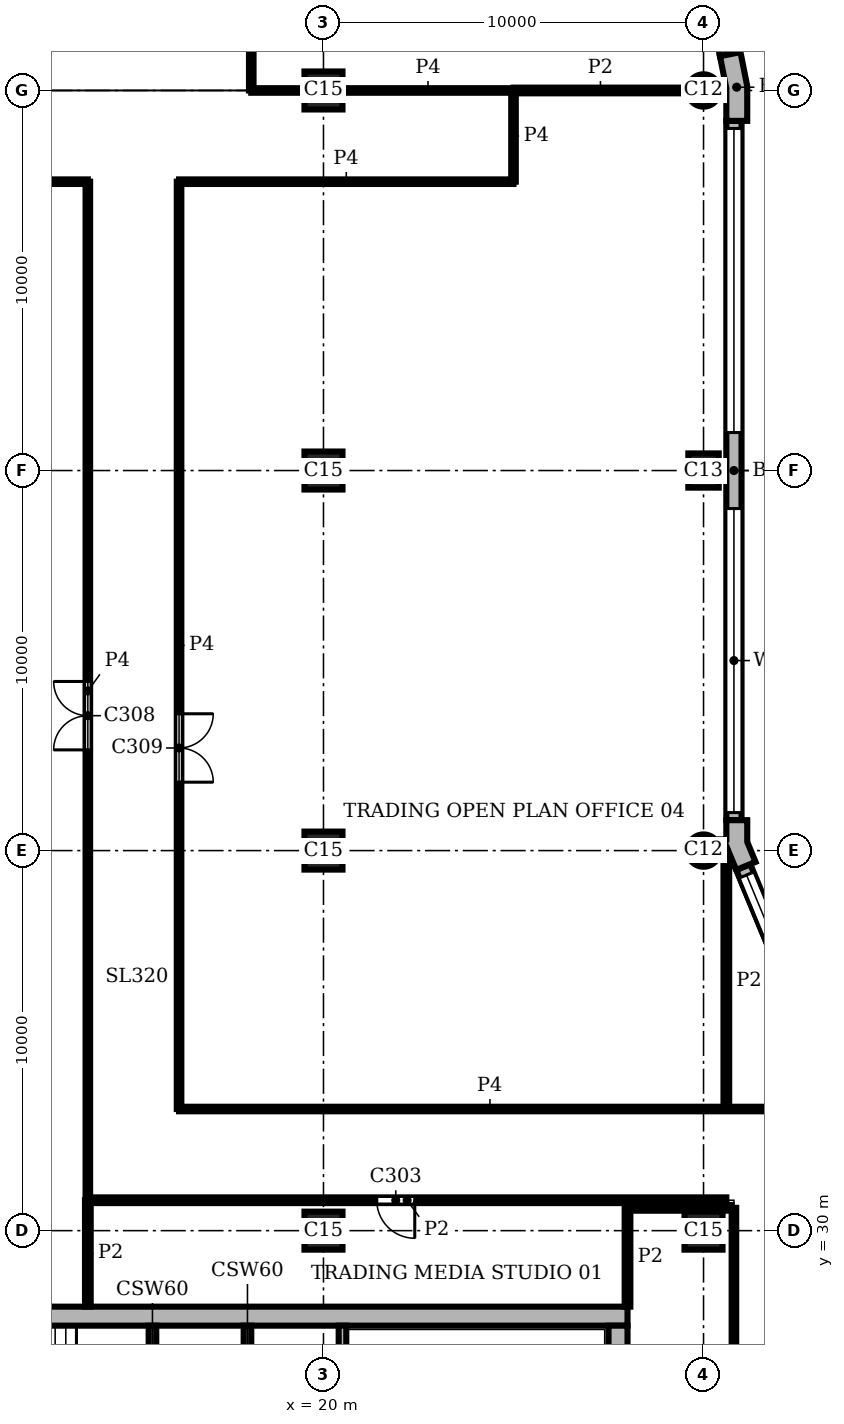
"""IFC4 building model, lengths in metres.
Left out: names, types, materials, properties, quantities, classifications, styles, units other than length and angle.
Written with IfcOpenShell. Run it as: python <this file> out.ifc"""

import sys

from ifc_helpers import new_model, si_unit, direction, frame, frame_2d, origin, origin_2d, place, context, subcontext, project, spatial, polyline, rectangle, circle, outline, extrude, element, fill, save


model = new_model("IFC4")
c1 = context("Model", 3, precision=1e-05, world=origin(), true_north=direction((0.0, 1.0)))
c2 = subcontext(c1, "Body", "Model", "MODEL_VIEW")
j1 = project(units=[si_unit("LENGTHUNIT", "METRE"), si_unit("PLANEANGLEUNIT", "RADIAN")], contexts=[c1])
p1 = place(None, origin())
s1 = spatial("IfcSite", under=j1, at=p1, CompositionType="ELEMENT")
p2 = place(p1, origin())
s2 = spatial("IfcBuilding", under=s1, at=p2, CompositionType="ELEMENT")
p3 = place(p2, frame((0.0, 0.0, 274.8)))
s3 = spatial("IfcBuildingStorey", under=s2, at=p3, CompositionType="ELEMENT", Elevation=274.8)
p4 = place(p3, frame((30.0, 40.0, 0.0), z_axis=(0.0, 0.0, 1.0), x_axis=(1.0, 0.0, 0.0)))
e1 = element("IfcColumn", 1, at=p4, inside=s3, PredefinedType="COLUMN", context=c2, shape_type="SweptSolid", body=[
    extrude(circle(Radius=0.425, at=origin_2d()), origin(), (0.0, 0.0, 1.0), 3.9),
])
p5 = place(p3, frame((30.0, 50.0, 0.0), z_axis=(0.0, 0.0, 1.0), x_axis=(0.0, 1.0, 0.0)))
e2 = element("IfcColumn", 2, at=p5, inside=s3, PredefinedType="COLUMN", context=c2, shape_type="SweptSolid", body=[
    extrude(rectangle(XDim=0.9, YDim=0.8, at=origin_2d()), origin(), (0.0, 0.0, 1.0), 3.9),
])
p6 = place(p3, frame((30.0, 60.0, 0.0), z_axis=(0.0, 0.0, 1.0), x_axis=(1.0, 0.0, 0.0)))
e3 = element("IfcColumn", 3, at=p6, inside=s3, PredefinedType="COLUMN", context=c2, shape_type="SweptSolid", body=[
    extrude(circle(Radius=0.425, at=origin_2d()), origin(), (0.0, 0.0, 1.0), 3.9),
])
for number, where, z_axis, x_axis in (
    (4, (20.0, 30.0, 0.0), (0.0, 0.0, 1.0), (1.0, 0.0, 0.0)),
    (5, (20.0, 40.0, 0.0), (0.0, 0.0, 1.0), (1.0, 0.0, 0.0)),
    (6, (20.0, 50.0, 0.0), (0.0, 0.0, 1.0), (1.0, 0.0, 0.0)),
    (7, (20.0, 60.0, 0.0), (0.0, 0.0, 1.0), (1.0, 0.0, 0.0)),
    (8, (30.0, 30.0, 0.0), (0.0, 0.0, 1.0), (1.0, 0.0, 0.0)),
):
    element("IfcColumn", number, at=place(p3, frame(where, z_axis=z_axis, x_axis=x_axis)), inside=s3, PredefinedType="COLUMN", context=c2, shape_type="SweptSolid", body=[
        extrude(rectangle(XDim=1.0, YDim=1.0, at=origin_2d()), origin(), (0.0, 0.0, 1.0), 3.9),
    ])
p7 = place(p3, frame((27.75, 8.5, 0.0), z_axis=(0.0, 0.0, 1.0), x_axis=(0.0, 1.0, 0.0)))
e9 = element("IfcWall", 9, at=p7, inside=s3, PredefinedType="SHEAR", context=c2, shape_type="SweptSolid", body=[
    extrude(rectangle(XDim=19.0, YDim=0.5, at=frame_2d((9.5, 0.0))), origin(), (0.0, 0.0, 1.0), 3.9),
])
p8 = place(p7, frame((4.95, 0.0, 0.0)))
e10 = element("IfcOpeningElement", 10, at=p8, cuts=e9, PredefinedType="OPENING", context=c2, shape_type="SweptSolid", body=[
    extrude(rectangle(XDim=1.6, YDim=2.1, at=frame_2d((0.8, 1.05))), frame((0.0, 0.26, 0.0), z_axis=(0.0, -1.0, 0.0), x_axis=(1.0, 0.0, 0.0)), (0.0, 0.0, 1.0), 0.52),
])
p9 = place(p3, frame((28.0, 27.75, 0.0), z_axis=(0.0, 0.0, 1.0), x_axis=(-1.0, 0.0, 0.0)))
e11 = element("IfcWall", 11, at=p9, inside=s3, PredefinedType="SHEAR", context=c2, shape_type="SweptSolid", body=[
    extrude(rectangle(XDim=20.0, YDim=0.5, at=frame_2d((10.0, 0.0))), origin(), (0.0, 0.0, 1.0), 3.9),
])
p10 = place(p3, origin())
e12 = element("IfcWall", 12, at=p10, inside=s3, PredefinedType="SOLIDWALL", context=c2, shape_type="SweptSolid", body=[
    extrude(outline(polyline([(30.62, 39.995), (30.62, 40.071), (30.861, 39.49), (31.23, 39.644), (31.369, 39.701), (31.15, 40.229), (31.15, 40.8), (31.0, 40.8), (30.6, 40.8), (30.6, 40.295), (30.425, 40.295), (30.425, 39.995), (30.62, 39.995)])), origin(), (0.0, 0.0, 1.0), 3.9),
])
e13 = element("IfcWall", 13, at=p10, inside=s3, PredefinedType="SOLIDWALL", context=c2, shape_type="SweptSolid", body=[
    extrude(outline(polyline([(31.0, 59.2), (31.15, 59.2), (31.15, 60.113), (30.972, 61.009), (30.825, 60.98), (30.432, 60.902), (30.6, 60.059), (30.6, 59.2), (31.0, 59.2)])), origin(), (0.0, 0.0, 1.0), 3.9),
])
p11 = place(p3, frame((33.362, 33.974, 0.0), z_axis=(0.0, 0.0, 1.0), x_axis=(-0.382655745237, 0.923891000409, 0.0)))
e14 = element("IfcWall", 14, at=p11, inside=s3, PredefinedType="SOLIDWALL", context=c2, shape_type="SweptSolid", body=[
    extrude(rectangle(XDim=6.053, YDim=0.4, at=frame_2d((3.027, 0.0))), origin(), (0.0, 0.0, 1.0), 3.9),
])
p12 = place(p11, frame((0.227, 0.0, 0.9)))
e15 = element("IfcOpeningElement", 15, at=p12, cuts=e14, PredefinedType="OPENING", context=c2, shape_type="SweptSolid", body=[
    extrude(rectangle(XDim=5.6, YDim=2.35, at=frame_2d((2.8, 1.175))), frame((0.0, 0.21, 0.0), z_axis=(0.0, -1.0, 0.0), x_axis=(1.0, 0.0, 0.0)), (0.0, 0.0, 1.0), 0.42),
])
p13 = place(p3, frame((30.8, 40.8, 0.0), z_axis=(0.0, 0.0, 1.0), x_axis=(0.0, 1.0, 0.0)))
e16 = element("IfcWall", 16, at=p13, inside=s3, PredefinedType="SOLIDWALL", context=c2, shape_type="SweptSolid", body=[
    extrude(rectangle(XDim=18.4, YDim=0.4, at=frame_2d((9.2, 0.0))), origin(), (0.0, 0.0, 1.0), 3.9),
])
p14 = place(p13, frame((0.2, 0.0, 0.9)))
e17 = element("IfcOpeningElement", 17, at=p14, cuts=e16, PredefinedType="OPENING", context=c2, shape_type="SweptSolid", body=[
    extrude(rectangle(XDim=8.0, YDim=2.35, at=frame_2d((4.0, 1.175))), frame((0.0, 0.21, 0.0), z_axis=(0.0, -1.0, 0.0), x_axis=(1.0, 0.0, 0.0)), (0.0, 0.0, 1.0), 0.42),
])
p15 = place(p13, frame((10.2, 0.0, 0.9)))
e18 = element("IfcOpeningElement", 18, at=p15, cuts=e16, PredefinedType="OPENING", context=c2, shape_type="SweptSolid", body=[
    extrude(rectangle(XDim=8.0, YDim=2.35, at=frame_2d((4.0, 1.175))), frame((0.0, 0.21, 0.0), z_axis=(0.0, -1.0, 0.0), x_axis=(1.0, 0.0, 0.0)), (0.0, 0.0, 1.0), 0.42),
])
p16 = place(p3, frame((30.629, 60.941, 0.0), z_axis=(0.0, 0.0, 1.0), x_axis=(-0.195098533057, 0.98078364709, 0.0)))
e19 = element("IfcWall", 19, at=p16, inside=s3, PredefinedType="SOLIDWALL", context=c2, shape_type="SweptSolid", body=[
    extrude(rectangle(XDim=4.753, YDim=0.4, at=frame_2d((2.376, 0.0))), origin(), (0.0, 0.0, 1.0), 3.9),
])
p17 = place(p16, frame((0.226, 0.0, 0.9)))
e20 = element("IfcOpeningElement", 20, at=p17, cuts=e19, PredefinedType="OPENING", context=c2, shape_type="SweptSolid", body=[
    extrude(rectangle(XDim=4.3, YDim=2.35, at=frame_2d((2.15, 1.175))), frame((0.0, 0.21, 0.0), z_axis=(0.0, -1.0, 0.0), x_axis=(1.0, 0.0, 0.0)), (0.0, 0.0, 1.0), 0.42),
])
p18 = place(p3, frame((15.5, 23.6, 0.0), z_axis=(0.0, 0.0, 1.0), x_axis=(0.0, 1.0, 0.0)))
e21 = element("IfcWall", 21, at=p18, inside=s3, PredefinedType="SHEAR", context=c2, shape_type="SweptSolid", body=[
    extrude(rectangle(XDim=3.9, YDim=0.2, at=frame_2d((1.95, 0.0))), origin(), (0.0, 0.0, 1.0), 3.58),
])
p19 = place(p3, frame((18.0, 20.0, 0.0), z_axis=(0.0, 0.0, 1.0), x_axis=(0.0, 1.0, 0.0)))
e22 = element("IfcWall", 22, at=p19, inside=s3, PredefinedType="SHEAR", context=c2, shape_type="SweptSolid", body=[
    extrude(rectangle(XDim=7.5, YDim=0.2, at=frame_2d((3.75, 0.0))), origin(), (0.0, 0.0, 1.0), 3.58),
])
p20 = place(p19, frame((1.2, 0.0, 0.0)))
e23 = element("IfcOpeningElement", 23, at=p20, cuts=e22, PredefinedType="OPENING", context=c2, shape_type="SweptSolid", body=[
    extrude(rectangle(XDim=1.2, YDim=2.1, at=frame_2d((0.6, 1.05))), frame((0.0, 0.11, 0.0), z_axis=(0.0, -1.0, 0.0), x_axis=(1.0, 0.0, 0.0)), (0.0, 0.0, 1.0), 0.22),
])
p21 = place(p3, frame((20.5, 23.6, 0.0), z_axis=(0.0, 0.0, 1.0), x_axis=(0.0, 1.0, 0.0)))
e24 = element("IfcWall", 24, at=p21, inside=s3, PredefinedType="SHEAR", context=c2, shape_type="SweptSolid", body=[
    extrude(rectangle(XDim=3.9, YDim=0.2, at=frame_2d((1.95, 0.0))), origin(), (0.0, 0.0, 1.0), 3.58),
])
p22 = place(p3, frame((13.8, 28.0, 0.0), z_axis=(0.0, 0.0, 1.0), x_axis=(0.0, 1.0, 0.0)))
e25 = element("IfcWall", 25, at=p22, inside=s3, PredefinedType="PARTITIONING", context=c2, shape_type="SweptSolid", body=[
    extrude(rectangle(XDim=2.801, YDim=0.15, at=frame_2d((1.4, 0.0))), origin(), (0.0, 0.0, 1.0), 3.58),
])
p23 = place(p3, frame((28.0, 28.0, 0.0), z_axis=(0.0, 0.0, 1.0), x_axis=(0.0, 1.0, 0.0)))
e26 = element("IfcWall", 26, at=p23, inside=s3, PredefinedType="PARTITIONING", context=c2, shape_type="SweptSolid", body=[
    extrude(rectangle(XDim=2.598, YDim=0.15, at=frame_2d((1.299, 0.0))), origin(), (0.0, 0.0, 1.0), 3.58),
])
p24 = place(p3, frame((30.6, 33.2, 0.0), z_axis=(0.0, 0.0, 1.0), x_axis=(0.0, 1.0, 0.0)))
e27 = element("IfcWall", 27, at=p24, inside=s3, PredefinedType="PARTITIONING", context=c2, shape_type="SweptSolid", body=[
    extrude(rectangle(XDim=6.738, YDim=0.15, at=frame_2d((3.369, 0.0))), origin(), (0.0, 0.0, 1.0), 3.58),
])
p25 = place(p3, frame((28.002, 30.6, 0.0), z_axis=(0.0, 0.0, 1.0), x_axis=(1.0, 0.0, 0.0)))
e28 = element("IfcWall", 28, at=p25, inside=s3, PredefinedType="PARTITIONING", context=c2, shape_type="SweptSolid", body=[
    extrude(rectangle(XDim=2.738, YDim=0.15, at=frame_2d((1.369, 0.0))), origin(), (0.0, 0.0, 1.0), 3.58),
])
p26 = place(p3, frame((13.802, 30.8, 0.0), z_axis=(0.0, 0.0, 1.0), x_axis=(1.0, 0.0, 0.0)))
e29 = element("IfcWall", 29, at=p26, inside=s3, PredefinedType="PARTITIONING", context=c2, shape_type="SweptSolid", body=[
    extrude(rectangle(XDim=16.798, YDim=0.15, at=frame_2d((8.399, 0.0))), origin(), (0.0, 0.0, 1.0), 3.58),
])
p27 = place(p26, frame((7.6, 0.0, 0.0)))
e30 = element("IfcOpeningElement", 30, at=p27, cuts=e29, PredefinedType="OPENING", context=c2, shape_type="SweptSolid", body=[
    extrude(rectangle(XDim=1.0, YDim=2.1, at=frame_2d((0.5, 1.05))), frame((0.0, 0.085, 0.0), z_axis=(0.0, -1.0, 0.0), x_axis=(1.0, 0.0, 0.0)), (0.0, 0.0, 1.0), 0.17),
])
p28 = place(p3, frame((25.0, 60.0, 0.0), z_axis=(0.0, 0.0, 1.0), x_axis=(1.0, 0.0, 0.0)))
e31 = element("IfcWall", 31, at=p28, inside=s3, PredefinedType="PARTITIONING", context=c2, shape_type="SweptSolid", body=[
    extrude(rectangle(XDim=4.575, YDim=0.15, at=frame_2d((2.288, 0.0))), origin(), (0.0, 0.0, 1.0), 3.58),
])
p29 = place(p3, frame((13.8, 30.8, 0.0), z_axis=(0.0, 0.0, 1.0), x_axis=(0.0, 1.0, 0.0)))
e32 = element("IfcWall", 32, at=p29, inside=s3, PredefinedType="PARTITIONING", context=c2, shape_type="SweptSolid", body=[
    extrude(rectangle(XDim=26.8, YDim=0.12, at=frame_2d((13.4, 0.0))), origin(), (0.0, 0.0, 1.0), 3.58),
])
p30 = place(p29, frame((11.85, 0.0, 0.0)))
e33 = element("IfcOpeningElement", 33, at=p30, cuts=e32, PredefinedType="OPENING", context=c2, shape_type="SweptSolid", body=[
    extrude(rectangle(XDim=1.8, YDim=2.1, at=frame_2d((0.9, 1.05))), frame((0.0, 0.07, 0.0), z_axis=(0.0, -1.0, 0.0), x_axis=(1.0, 0.0, 0.0)), (0.0, 0.0, 1.0), 0.14),
])
p31 = place(p3, frame((16.2, 33.2, 0.0), z_axis=(0.0, 0.0, 1.0), x_axis=(0.0, 1.0, 0.0)))
e34 = element("IfcWall", 34, at=p31, inside=s3, PredefinedType="PARTITIONING", context=c2, shape_type="SweptSolid", body=[
    extrude(rectangle(XDim=24.4, YDim=0.12, at=frame_2d((12.2, 0.0))), origin(), (0.0, 0.0, 1.0), 3.58),
])
p32 = place(p31, frame((8.6, 0.0, 0.0)))
e35 = element("IfcOpeningElement", 35, at=p32, cuts=e34, PredefinedType="OPENING", context=c2, shape_type="SweptSolid", body=[
    extrude(rectangle(XDim=1.8, YDim=2.1, at=frame_2d((0.9, 1.05))), frame((0.0, 0.07, 0.0), z_axis=(0.0, -1.0, 0.0), x_axis=(1.0, 0.0, 0.0)), (0.0, 0.0, 1.0), 0.14),
])
p33 = place(p3, frame((18.1, 60.0, 0.0), z_axis=(0.0, 0.0, 1.0), x_axis=(0.0, 1.0, 0.0)))
e36 = element("IfcWall", 36, at=p33, inside=s3, PredefinedType="PARTITIONING", context=c2, shape_type="SweptSolid", body=[
    extrude(rectangle(XDim=6.4, YDim=0.12, at=frame_2d((3.2, 0.0))), origin(), (0.0, 0.0, 1.0), 3.58),
])
p34 = place(p33, frame((2.6, 0.0, 0.0)))
e37 = element("IfcOpeningElement", 37, at=p34, cuts=e36, PredefinedType="OPENING", context=c2, shape_type="SweptSolid", body=[
    extrude(rectangle(XDim=1.8, YDim=2.1, at=frame_2d((0.9, 1.05))), frame((0.0, 0.07, 0.0), z_axis=(0.0, -1.0, 0.0), x_axis=(1.0, 0.0, 0.0)), (0.0, 0.0, 1.0), 0.14),
])
p35 = place(p3, frame((25.0, 57.6, 0.0), z_axis=(0.0, 0.0, 1.0), x_axis=(0.0, 1.0, 0.0)))
e38 = element("IfcWall", 38, at=p35, inside=s3, PredefinedType="PARTITIONING", context=c2, shape_type="SweptSolid", body=[
    extrude(rectangle(XDim=2.4, YDim=0.12, at=frame_2d((1.2, 0.0))), origin(), (0.0, 0.0, 1.0), 3.58),
])
p36 = place(p3, frame((30.8, 15.45, 0.0), z_axis=(0.0, 0.0, 1.0), x_axis=(0.0, 1.0, 0.0)))
e39 = element("IfcWall", 39, at=p36, inside=s3, PredefinedType="PARTITIONING", context=c2, shape_type="SweptSolid", body=[
    extrude(rectangle(XDim=15.15, YDim=0.12, at=frame_2d((7.575, 0.0))), origin(), (0.0, 0.0, 1.0), 3.58),
])
p37 = place(p36, frame((8.35, 0.0, 0.0)))
e40 = element("IfcOpeningElement", 40, at=p37, cuts=e39, PredefinedType="OPENING", context=c2, shape_type="SweptSolid", body=[
    extrude(rectangle(XDim=1.8, YDim=2.1, at=frame_2d((0.9, 1.05))), frame((0.0, 0.07, 0.0), z_axis=(0.0, -1.0, 0.0), x_axis=(1.0, 0.0, 0.0)), (0.0, 0.0, 1.0), 0.14),
])
p38 = place(p3, frame((16.2, 33.2, 0.0), z_axis=(0.0, 0.0, 1.0), x_axis=(1.0, 0.0, 0.0)))
e41 = element("IfcWall", 41, at=p38, inside=s3, PredefinedType="PARTITIONING", context=c2, shape_type="SweptSolid", body=[
    extrude(rectangle(XDim=16.36, YDim=0.12, at=frame_2d((8.18, 0.0))), origin(), (0.0, 0.0, 1.0), 3.58),
])
for number, where, z_axis, x_axis in (
    (42, (5.0, 57.6, 0.0), (0.0, 0.0, 1.0), (1.0, 0.0, 0.0)),
    (43, (16.2, 57.6, 0.0), (0.0, 0.0, 1.0), (1.0, 0.0, 0.0)),
):
    element("IfcWall", number, at=place(p3, frame(where, z_axis=z_axis, x_axis=x_axis)), inside=s3, PredefinedType="PARTITIONING", context=c2, shape_type="SweptSolid", body=[
        extrude(rectangle(XDim=8.8, YDim=0.12, at=frame_2d((4.4, 0.0))), origin(), (0.0, 0.0, 1.0), 3.58),
    ])
p39 = place(p3, frame((18.1, 60.0, 0.0), z_axis=(0.0, 0.0, 1.0), x_axis=(1.0, 0.0, 0.0)))
e44 = element("IfcWall", 44, at=p39, inside=s3, PredefinedType="PARTITIONING", context=c2, shape_type="SweptSolid", body=[
    extrude(rectangle(XDim=1.4, YDim=0.12, at=frame_2d((0.7, 0.0))), origin(), (0.0, 0.0, 1.0), 3.58),
])
p40 = place(p3, frame((20.5, 60.0, 0.0), z_axis=(0.0, 0.0, 1.0), x_axis=(1.0, 0.0, 0.0)))
e45 = element("IfcWall", 45, at=p40, inside=s3, PredefinedType="PARTITIONING", context=c2, shape_type="SweptSolid", body=[
    extrude(rectangle(XDim=4.5, YDim=0.12, at=frame_2d((2.25, 0.0))), origin(), (0.0, 0.0, 1.0), 3.58),
])
p41 = place(p12, origin())
e46 = element("IfcWindow", 46, at=p41, inside=s3, PartitioningType="SINGLE_PANEL", PredefinedType="WINDOW", context=c2, shape_type="SweptSolid", body=[
    extrude(rectangle(XDim=5.6, YDim=2.35, at=frame_2d((2.8, 1.175))), frame((0.0, 0.16, 0.0), z_axis=(0.0, -1.0, 0.0), x_axis=(1.0, 0.0, 0.0)), (0.0, 0.0, 1.0), 0.06),
])
fill(e15, e46)
p42 = place(p14, origin())
e47 = element("IfcWindow", 47, at=p42, inside=s3, PartitioningType="SINGLE_PANEL", PredefinedType="WINDOW", context=c2, shape_type="SweptSolid", body=[
    extrude(rectangle(XDim=8.0, YDim=2.35, at=frame_2d((4.0, 1.175))), frame((0.0, 0.16, 0.0), z_axis=(0.0, -1.0, 0.0), x_axis=(1.0, 0.0, 0.0)), (0.0, 0.0, 1.0), 0.06),
])
fill(e17, e47)
p43 = place(p15, origin())
e48 = element("IfcWindow", 48, at=p43, inside=s3, PartitioningType="SINGLE_PANEL", PredefinedType="WINDOW", context=c2, shape_type="SweptSolid", body=[
    extrude(rectangle(XDim=8.0, YDim=2.35, at=frame_2d((4.0, 1.175))), frame((0.0, 0.16, 0.0), z_axis=(0.0, -1.0, 0.0), x_axis=(1.0, 0.0, 0.0)), (0.0, 0.0, 1.0), 0.06),
])
fill(e18, e48)
p44 = place(p27, frame((1.0, 0.0, 0.0), z_axis=(0.0, 0.0, 1.0), x_axis=(-1.0, 0.0, 0.0)))
e49 = element("IfcDoor", 49, at=p44, inside=s3, OperationType="SINGLE_SWING_LEFT", PredefinedType="DOOR", context=c2, shape_type="SweptSolid", body=[
    extrude(rectangle(XDim=1.0, YDim=2.1, at=frame_2d((0.5, 1.05))), frame((0.0, 0.025, 0.0), z_axis=(0.0, -1.0, 0.0), x_axis=(1.0, 0.0, 0.0)), (0.0, 0.0, 1.0), 0.05),
])
fill(e30, e49)
p45 = place(p30, origin())
e50 = element("IfcDoor", 50, at=p45, inside=s3, OperationType="DOUBLE_DOOR_SINGLE_SWING", PredefinedType="DOOR", context=c2, shape_type="SweptSolid", body=[
    extrude(rectangle(XDim=1.8, YDim=2.1, at=frame_2d((0.9, 1.05))), frame((0.0, 0.025, 0.0), z_axis=(0.0, -1.0, 0.0), x_axis=(1.0, 0.0, 0.0)), (0.0, 0.0, 1.0), 0.05),
])
fill(e33, e50)
p46 = place(p32, frame((1.8, 0.0, 0.0), z_axis=(0.0, 0.0, 1.0), x_axis=(-1.0, 0.0, 0.0)))
e51 = element("IfcDoor", 51, at=p46, inside=s3, OperationType="DOUBLE_DOOR_SINGLE_SWING", PredefinedType="DOOR", context=c2, shape_type="SweptSolid", body=[
    extrude(rectangle(XDim=1.8, YDim=2.1, at=frame_2d((0.9, 1.05))), frame((0.0, 0.025, 0.0), z_axis=(0.0, -1.0, 0.0), x_axis=(1.0, 0.0, 0.0)), (0.0, 0.0, 1.0), 0.05),
])
fill(e35, e51)
save(model, sys.argv[1])
